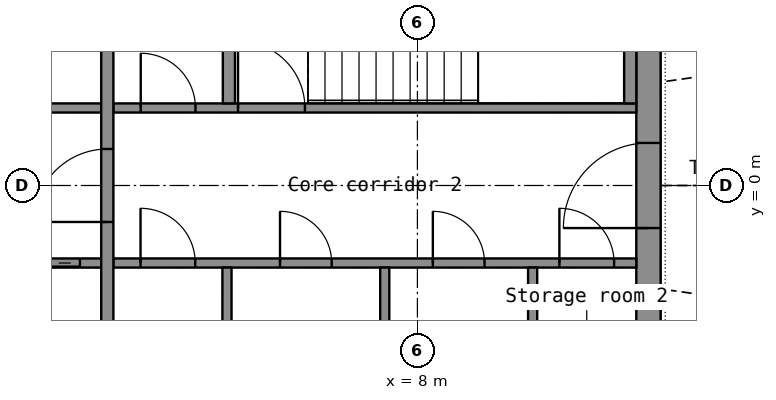
"""IFC4 building model, lengths in metres.
Left out: names, types, materials, properties, quantities, classifications, styles, units other than length and angle.
Written with IfcOpenShell. Run it as: python <this file> out.ifc"""

import sys

from ifc_helpers import new_model, si_unit, direction, frame, frame_2d, origin, place, context, subcontext, project, spatial, rectangle, extrude, element, fill, save


model = new_model("IFC4")
c1 = context("Model", 3, precision=1e-05, world=origin(), true_north=direction((0.0, 1.0)))
c2 = subcontext(c1, "Body", "Model", "MODEL_VIEW")
j1 = project(units=[si_unit("LENGTHUNIT", "METRE"), si_unit("PLANEANGLEUNIT", "RADIAN")], contexts=[c1])
p1 = place(None, origin())
s1 = spatial("IfcSite", under=j1, at=p1, CompositionType="ELEMENT")
p2 = place(p1, origin())
s2 = spatial("IfcBuilding", under=s1, at=p2, CompositionType="ELEMENT")
p3 = place(p2, frame((0.0, 0.0, 235.6)))
s3 = spatial("IfcBuildingStorey", under=s2, at=p3, CompositionType="ELEMENT", Elevation=235.6)
p4 = place(p3, frame((11.8, -7.2, 0.0), z_axis=(0.0, 0.0, 1.0), x_axis=(0.0, 1.0, 0.0)))
e1 = element("IfcWall", 1, at=p4, inside=s3, PredefinedType="SHEAR", context=c2, shape_type="SweptSolid", body=[
    extrude(rectangle(XDim=14.4, YDim=0.4, at=frame_2d((7.2, 0.0))), origin(), (0.0, 0.0, 1.0), 3.3),
])
p5 = place(p4, frame((6.5, 0.0, 0.0)))
e2 = element("IfcOpeningElement", 2, at=p5, cuts=e1, PredefinedType="OPENING", context=c2, shape_type="SweptSolid", body=[
    extrude(rectangle(XDim=1.4, YDim=2.2, at=frame_2d((0.7, 1.1))), frame((0.0, 0.21, 0.0), z_axis=(0.0, -1.0, 0.0), x_axis=(1.0, 0.0, 0.0)), (0.0, 0.0, 1.0), 0.42),
])
p6 = place(p3, frame((-2.8, -1.275, 0.0), z_axis=(0.0, 0.0, 1.0), x_axis=(1.0, 0.0, 0.0)))
e3 = element("IfcWall", 3, at=p6, inside=s3, PredefinedType="SHEAR", context=c2, shape_type="SweptSolid", body=[
    extrude(rectangle(XDim=5.6, YDim=0.15, at=frame_2d((2.8, 0.0))), origin(), (0.0, 0.0, 1.0), 3.3),
])
p7 = place(p6, frame((4.15, 0.0, 0.0)))
e4 = element("IfcOpeningElement", 4, at=p7, cuts=e3, PredefinedType="OPENING", context=c2, shape_type="SweptSolid", body=[
    extrude(rectangle(XDim=1.1, YDim=2.2, at=frame_2d((0.55, 1.1))), frame((0.0, 0.085, 0.0), z_axis=(0.0, -1.0, 0.0), x_axis=(1.0, 0.0, 0.0)), (0.0, 0.0, 1.0), 0.17),
])
p8 = place(p6, frame((1.35, 0.0, 0.0)))
e5 = element("IfcOpeningElement", 5, at=p8, cuts=e3, PredefinedType="OPENING", context=c2, shape_type="SweptSolid", body=[
    extrude(rectangle(XDim=0.9, YDim=2.1, at=frame_2d((0.45, 1.05))), frame((0.0, 0.085, 0.0), z_axis=(0.0, -1.0, 0.0), x_axis=(1.0, 0.0, 0.0)), (0.0, 0.0, 1.0), 0.17),
])
p9 = place(p3, frame((3.0, -1.275, 0.0), z_axis=(0.0, 0.0, 1.0), x_axis=(1.0, 0.0, 0.0)))
e6 = element("IfcWall", 6, at=p9, inside=s3, PredefinedType="PARTITIONING", context=c2, shape_type="SweptSolid", body=[
    extrude(rectangle(XDim=8.6, YDim=0.15, at=frame_2d((4.3, 0.0))), origin(), (0.0, 0.0, 1.0), 3.3),
])
p10 = place(p9, frame((0.447, 0.0, 0.0)))
e7 = element("IfcOpeningElement", 7, at=p10, cuts=e6, PredefinedType="OPENING", context=c2, shape_type="SweptSolid", body=[
    extrude(rectangle(XDim=0.9, YDim=2.1, at=frame_2d((0.45, 1.05))), frame((0.0, 0.085, 0.0), z_axis=(0.0, -1.0, 0.0), x_axis=(1.0, 0.0, 0.0)), (0.0, 0.0, 1.0), 0.17),
])
p11 = place(p9, frame((2.74, 0.0, 0.0)))
e8 = element("IfcOpeningElement", 8, at=p11, cuts=e6, PredefinedType="OPENING", context=c2, shape_type="SweptSolid", body=[
    extrude(rectangle(XDim=0.85, YDim=2.1, at=frame_2d((0.425, 1.05))), frame((0.0, 0.085, 0.0), z_axis=(0.0, -1.0, 0.0), x_axis=(1.0, 0.0, 0.0)), (0.0, 0.0, 1.0), 0.17),
])
p12 = place(p9, frame((5.254, 0.0, 0.0)))
e9 = element("IfcOpeningElement", 9, at=p12, cuts=e6, PredefinedType="OPENING", context=c2, shape_type="SweptSolid", body=[
    extrude(rectangle(XDim=0.85, YDim=2.1, at=frame_2d((0.425, 1.05))), frame((0.0, 0.085, 0.0), z_axis=(0.0, -1.0, 0.0), x_axis=(1.0, 0.0, 0.0)), (0.0, 0.0, 1.0), 0.17),
])
p13 = place(p9, frame((7.335, 0.0, 0.0)))
e10 = element("IfcOpeningElement", 10, at=p13, cuts=e6, PredefinedType="OPENING", context=c2, shape_type="SweptSolid", body=[
    extrude(rectangle(XDim=0.9, YDim=2.1, at=frame_2d((0.45, 1.05))), frame((0.0, 0.085, 0.0), z_axis=(0.0, -1.0, 0.0), x_axis=(1.0, 0.0, 0.0)), (0.0, 0.0, 1.0), 0.17),
])
p14 = place(p3, frame((-2.8, 1.275, 0.0), z_axis=(0.0, 0.0, 1.0), x_axis=(1.0, 0.0, 0.0)))
e11 = element("IfcWall", 11, at=p14, inside=s3, PredefinedType="SHEAR", context=c2, shape_type="SweptSolid", body=[
    extrude(rectangle(XDim=5.6, YDim=0.15, at=frame_2d((2.8, 0.0))), origin(), (0.0, 0.0, 1.0), 3.3),
])
p15 = place(p14, frame((0.35, 0.0, 0.0)))
e12 = element("IfcOpeningElement", 12, at=p15, cuts=e11, PredefinedType="OPENING", context=c2, shape_type="SweptSolid", body=[
    extrude(rectangle(XDim=1.1, YDim=2.2, at=frame_2d((0.55, 1.1))), frame((0.0, 0.085, 0.0), z_axis=(0.0, -1.0, 0.0), x_axis=(1.0, 0.0, 0.0)), (0.0, 0.0, 1.0), 0.17),
])
p16 = place(p14, frame((3.35, 0.0, 0.0)))
e13 = element("IfcOpeningElement", 13, at=p16, cuts=e11, PredefinedType="OPENING", context=c2, shape_type="SweptSolid", body=[
    extrude(rectangle(XDim=0.9, YDim=2.1, at=frame_2d((0.45, 1.05))), frame((0.0, 0.085, 0.0), z_axis=(0.0, -1.0, 0.0), x_axis=(1.0, 0.0, 0.0)), (0.0, 0.0, 1.0), 0.17),
])
p17 = place(p3, frame((3.0, 1.275, 0.0), z_axis=(0.0, 0.0, 1.0), x_axis=(1.0, 0.0, 0.0)))
e14 = element("IfcWall", 14, at=p17, inside=s3, PredefinedType="SHEAR", context=c2, shape_type="SweptSolid", body=[
    extrude(rectangle(XDim=8.6, YDim=0.15, at=frame_2d((4.3, 0.0))), origin(), (0.0, 0.0, 1.0), 3.3),
])
p18 = place(p17, frame((2.05, 0.0, 0.0)))
e15 = element("IfcOpeningElement", 15, at=p18, cuts=e14, PredefinedType="OPENING", context=c2, shape_type="SweptSolid", body=[
    extrude(rectangle(XDim=1.1, YDim=2.15, at=frame_2d((0.55, 1.075))), frame((0.0, 0.085, 0.0), z_axis=(0.0, -1.0, 0.0), x_axis=(1.0, 0.0, 0.0)), (0.0, 0.0, 1.0), 0.17),
])
p19 = place(p17, frame((0.45, 0.0, 0.0)))
e16 = element("IfcOpeningElement", 16, at=p19, cuts=e14, PredefinedType="OPENING", context=c2, shape_type="SweptSolid", body=[
    extrude(rectangle(XDim=0.9, YDim=2.1, at=frame_2d((0.45, 1.05))), frame((0.0, 0.085, 0.0), z_axis=(0.0, -1.0, 0.0), x_axis=(1.0, 0.0, 0.0)), (0.0, 0.0, 1.0), 0.17),
])
p20 = place(p3, frame((2.9, -3.7, 0.0), z_axis=(0.0, 0.0, 1.0), x_axis=(0.0, 1.0, 0.0)))
e17 = element("IfcWall", 17, at=p20, inside=s3, PredefinedType="SHEAR", context=c2, shape_type="SweptSolid", body=[
    extrude(rectangle(XDim=7.4, YDim=0.2, at=frame_2d((3.7, 0.0))), origin(), (0.0, 0.0, 1.0), 3.3),
])
p21 = place(p20, frame((3.1, 0.0, 0.0)))
e18 = element("IfcOpeningElement", 18, at=p21, cuts=e17, PredefinedType="OPENING", context=c2, shape_type="SweptSolid", body=[
    extrude(rectangle(XDim=1.2, YDim=2.2, at=frame_2d((0.6, 1.1))), frame((0.0, 0.11, 0.0), z_axis=(0.0, -1.0, 0.0), x_axis=(1.0, 0.0, 0.0)), (0.0, 0.0, 1.0), 0.22),
])
for number, where, z_axis, x_axis in (
    (19, (11.5, 1.35, 0.0), (0.0, 0.0, 1.0), (0.0, 1.0, 0.0)),
    (20, (4.9, 1.35, 0.0), (0.0, 0.0, 1.0), (0.0, 1.0, 0.0)),
):
    element("IfcWall", number, at=place(p3, frame(where, z_axis=z_axis, x_axis=x_axis)), inside=s3, PredefinedType="SHEAR", context=c2, shape_type="SweptSolid", body=[
        extrude(rectangle(XDim=2.35, YDim=0.2, at=frame_2d((1.175, 0.0))), origin(), (0.0, 0.0, 1.0), 3.3),
    ])
for number, where, z_axis, x_axis in (
    (21, (4.868, -3.7, 0.0), (0.0, 0.0, 1.0), (0.0, 1.0, 0.0)),
    (22, (7.463, -3.7, 0.0), (0.0, 0.0, 1.0), (0.0, 1.0, 0.0)),
    (23, (9.895, -3.7, 0.0), (0.0, 0.0, 1.0), (0.0, 1.0, 0.0)),
):
    element("IfcWall", number, at=place(p3, frame(where, z_axis=z_axis, x_axis=x_axis)), inside=s3, PredefinedType="PARTITIONING", context=c2, shape_type="SweptSolid", body=[
        extrude(rectangle(XDim=2.35, YDim=0.15, at=frame_2d((1.175, 0.0))), origin(), (0.0, 0.0, 1.0), 3.3),
    ])
p22 = place(p5, origin())
e24 = element("IfcDoor", 24, at=p22, inside=s3, OperationType="DOUBLE_DOOR_SINGLE_SWING", PredefinedType="DOOR", context=c2, shape_type="SweptSolid", body=[
    extrude(rectangle(XDim=1.4, YDim=2.2, at=frame_2d((0.7, 1.1))), frame((0.0, 0.025, 0.0), z_axis=(0.0, -1.0, 0.0), x_axis=(1.0, 0.0, 0.0)), (0.0, 0.0, 1.0), 0.05),
])
fill(e2, e24)
p23 = place(p21, origin())
e25 = element("IfcDoor", 25, at=p23, inside=s3, OperationType="SINGLE_SWING_LEFT", PredefinedType="DOOR", context=c2, shape_type="SweptSolid", body=[
    extrude(rectangle(XDim=1.2, YDim=2.2, at=frame_2d((0.6, 1.1))), frame((0.0, 0.025, 0.0), z_axis=(0.0, -1.0, 0.0), x_axis=(1.0, 0.0, 0.0)), (0.0, 0.0, 1.0), 0.05),
])
fill(e18, e25)
p24 = place(p7, origin())
e26 = element("IfcDoor", 26, at=p24, inside=s3, OperationType="DOUBLE_DOOR_SLIDING", PredefinedType="DOOR", context=c2, shape_type="SweptSolid", body=[
    extrude(rectangle(XDim=1.1, YDim=2.2, at=frame_2d((0.55, 1.1))), frame((0.0, 0.025, 0.0), z_axis=(0.0, -1.0, 0.0), x_axis=(1.0, 0.0, 0.0)), (0.0, 0.0, 1.0), 0.05),
])
fill(e4, e26)
p25 = place(p18, origin())
e27 = element("IfcDoor", 27, at=p25, inside=s3, OperationType="SINGLE_SWING_LEFT", PredefinedType="DOOR", context=c2, shape_type="SweptSolid", body=[
    extrude(rectangle(XDim=1.1, YDim=2.15, at=frame_2d((0.55, 1.075))), frame((0.0, 0.025, 0.0), z_axis=(0.0, -1.0, 0.0), x_axis=(1.0, 0.0, 0.0)), (0.0, 0.0, 1.0), 0.05),
])
fill(e15, e27)
p26 = place(p10, origin())
e28 = element("IfcDoor", 28, at=p26, inside=s3, OperationType="SINGLE_SWING_LEFT", PredefinedType="DOOR", context=c2, shape_type="SweptSolid", body=[
    extrude(rectangle(XDim=0.9, YDim=2.1, at=frame_2d((0.45, 1.05))), frame((0.0, 0.025, 0.0), z_axis=(0.0, -1.0, 0.0), x_axis=(1.0, 0.0, 0.0)), (0.0, 0.0, 1.0), 0.05),
])
fill(e7, e28)
p27 = place(p11, origin())
e29 = element("IfcDoor", 29, at=p27, inside=s3, OperationType="SINGLE_SWING_LEFT", PredefinedType="DOOR", context=c2, shape_type="SweptSolid", body=[
    extrude(rectangle(XDim=0.85, YDim=2.1, at=frame_2d((0.425, 1.05))), frame((0.0, 0.025, 0.0), z_axis=(0.0, -1.0, 0.0), x_axis=(1.0, 0.0, 0.0)), (0.0, 0.0, 1.0), 0.05),
])
fill(e8, e29)
p28 = place(p12, origin())
e30 = element("IfcDoor", 30, at=p28, inside=s3, OperationType="SINGLE_SWING_LEFT", PredefinedType="DOOR", context=c2, shape_type="SweptSolid", body=[
    extrude(rectangle(XDim=0.85, YDim=2.1, at=frame_2d((0.425, 1.05))), frame((0.0, 0.025, 0.0), z_axis=(0.0, -1.0, 0.0), x_axis=(1.0, 0.0, 0.0)), (0.0, 0.0, 1.0), 0.05),
])
fill(e9, e30)
p29 = place(p13, origin())
e31 = element("IfcDoor", 31, at=p29, inside=s3, OperationType="SINGLE_SWING_LEFT", PredefinedType="DOOR", context=c2, shape_type="SweptSolid", body=[
    extrude(rectangle(XDim=0.9, YDim=2.1, at=frame_2d((0.45, 1.05))), frame((0.0, 0.025, 0.0), z_axis=(0.0, -1.0, 0.0), x_axis=(1.0, 0.0, 0.0)), (0.0, 0.0, 1.0), 0.05),
])
fill(e10, e31)
p30 = place(p19, origin())
e32 = element("IfcDoor", 32, at=p30, inside=s3, OperationType="SINGLE_SWING_LEFT", PredefinedType="DOOR", context=c2, shape_type="SweptSolid", body=[
    extrude(rectangle(XDim=0.9, YDim=2.1, at=frame_2d((0.45, 1.05))), frame((0.0, 0.025, 0.0), z_axis=(0.0, -1.0, 0.0), x_axis=(1.0, 0.0, 0.0)), (0.0, 0.0, 1.0), 0.05),
])
fill(e16, e32)
save(model, sys.argv[1])
